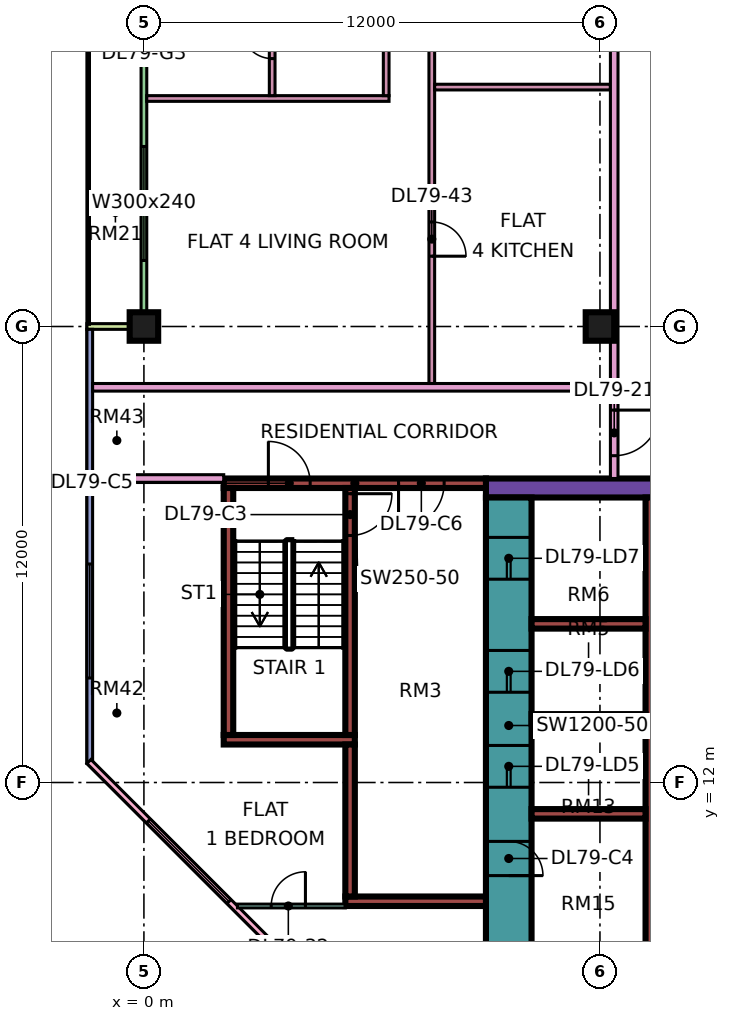
"""IFC4 building model, lengths in metres.
Left out: names, types, materials, properties, quantities, classifications, styles, units other than length and angle.
Written with IfcOpenShell. Run it as: python <this file> out.ifc"""

import sys

from ifc_helpers import new_model, si_unit, direction, frame, frame_2d, origin, origin_2d, place, context, subcontext, project, spatial, rectangle, extrude, element, fill, save


model = new_model("IFC4")
c1 = context("Model", 3, precision=1e-05, world=origin(), true_north=direction((0.0, 1.0)))
c2 = subcontext(c1, "Body", "Model", "MODEL_VIEW")
j1 = project(units=[si_unit("LENGTHUNIT", "METRE"), si_unit("PLANEANGLEUNIT", "RADIAN")], contexts=[c1])
p1 = place(None, origin())
s1 = spatial("IfcSite", under=j1, at=p1, CompositionType="ELEMENT")
p2 = place(p1, origin())
s2 = spatial("IfcBuilding", under=s1, at=p2, CompositionType="ELEMENT")
p3 = place(p2, frame((0.0, 0.0, 342.65)))
s3 = spatial("IfcBuildingStorey", under=s2, at=p3, CompositionType="ELEMENT", Elevation=342.65)
for number, where, z_axis, x_axis in (
    (1, (0.0, 24.0, 0.0), (0.0, 0.0, 1.0), (1.0, 0.0, 0.0)),
    (2, (12.0, 24.0, 0.0), (0.0, 0.0, 1.0), (1.0, 0.0, 0.0)),
):
    element("IfcColumn", number, at=place(p3, frame(where, z_axis=z_axis, x_axis=x_axis)), inside=s3, PredefinedType="COLUMN", context=c2, shape_type="SweptSolid", body=[
        extrude(rectangle(XDim=0.75, YDim=0.75, at=origin_2d()), origin(), (0.0, 0.0, 1.0), 3.75),
    ])
p4 = place(p3, frame((9.0, 19.75, 0.0), z_axis=(0.0, 0.0, 1.0), x_axis=(1.0, 0.0, 0.0)))
e3 = element("IfcWall", 3, at=p4, inside=s3, PredefinedType="SHEAR", context=c2, shape_type="SweptSolid", body=[
    extrude(rectangle(XDim=25.0, YDim=0.5, at=frame_2d((12.5, 0.0))), origin(), (0.0, 0.0, 1.0), 3.75),
])
p5 = place(p4, frame((19.1, 0.0, 0.0)))
e4 = element("IfcOpeningElement", 4, at=p5, cuts=e3, PredefinedType="OPENING", context=c2, shape_type="SweptSolid", body=[
    extrude(rectangle(XDim=1.8, YDim=2.4, at=frame_2d((0.9, 1.2))), frame((0.0, 0.26, 0.0), z_axis=(0.0, -1.0, 0.0), x_axis=(1.0, 0.0, 0.0)), (0.0, 0.0, 1.0), 0.52),
])
p6 = place(p3, frame((9.6, 7.5, 0.0), z_axis=(0.0, 0.0, 1.0), x_axis=(0.0, 1.0, 0.0)))
e5 = element("IfcWall", 5, at=p6, inside=s3, PredefinedType="SHEAR", context=c2, shape_type="SweptSolid", body=[
    extrude(rectangle(XDim=12.0, YDim=1.2, at=frame_2d((6.0, 0.0))), origin(), (0.0, 0.0, 1.0), 3.75),
])
p7 = place(p6, frame((4.375, 0.0, 0.0)))
e6 = element("IfcOpeningElement", 6, at=p7, cuts=e5, PredefinedType="OPENING", context=c2, shape_type="SweptSolid", body=[
    extrude(rectangle(XDim=1.1, YDim=2.2, at=frame_2d((0.55, 1.1))), frame((0.0, 0.61, 0.0), z_axis=(0.0, -1.0, 0.0), x_axis=(1.0, 0.0, 0.0)), (0.0, 0.0, 1.0), 1.22),
])
p8 = place(p6, frame((6.875, 0.0, 0.0)))
e7 = element("IfcOpeningElement", 7, at=p8, cuts=e5, PredefinedType="OPENING", context=c2, shape_type="SweptSolid", body=[
    extrude(rectangle(XDim=1.1, YDim=2.2, at=frame_2d((0.55, 1.1))), frame((0.0, 0.61, 0.0), z_axis=(0.0, -1.0, 0.0), x_axis=(1.0, 0.0, 0.0)), (0.0, 0.0, 1.0), 1.22),
])
p9 = place(p6, frame((9.85, 0.0, 0.0)))
e8 = element("IfcOpeningElement", 8, at=p9, cuts=e5, PredefinedType="OPENING", context=c2, shape_type="SweptSolid", body=[
    extrude(rectangle(XDim=1.1, YDim=2.2, at=frame_2d((0.55, 1.1))), frame((0.0, 0.61, 0.0), z_axis=(0.0, -1.0, 0.0), x_axis=(1.0, 0.0, 0.0)), (0.0, 0.0, 1.0), 1.22),
])
p10 = place(p6, frame((2.05, 0.0, 0.0)))
e9 = element("IfcOpeningElement", 9, at=p10, cuts=e5, PredefinedType="OPENING", context=c2, shape_type="SweptSolid", body=[
    extrude(rectangle(XDim=0.9, YDim=2.1, at=frame_2d((0.45, 1.05))), frame((0.0, 0.61, 0.0), z_axis=(0.0, -1.0, 0.0), x_axis=(1.0, 0.0, 0.0)), (0.0, 0.0, 1.0), 1.22),
])
p11 = place(p3, frame((13.325, 7.5, 0.0), z_axis=(0.0, 0.0, 1.0), x_axis=(0.0, 1.0, 0.0)))
e10 = element("IfcWall", 10, at=p11, inside=s3, PredefinedType="SHEAR", context=c2, shape_type="SweptSolid", body=[
    extrude(rectangle(XDim=12.0, YDim=0.25, at=frame_2d((6.0, 0.0))), origin(), (0.0, 0.0, 1.0), 3.75),
])
for number, where, z_axis, x_axis in (
    (11, (10.2, 11.175, 0.0), (0.0, 0.0, 1.0), (1.0, 0.0, 0.0)),
    (12, (10.2, 13.675, 0.0), (0.0, 0.0, 1.0), (1.0, 0.0, 0.0)),
    (13, (10.2, 16.175, 0.0), (0.0, 0.0, 1.0), (1.0, 0.0, 0.0)),
):
    element("IfcWall", number, at=place(p3, frame(where, z_axis=z_axis, x_axis=x_axis)), inside=s3, PredefinedType="SHEAR", context=c2, shape_type="SweptSolid", body=[
        extrude(rectangle(XDim=3.0, YDim=0.25, at=frame_2d((1.5, 0.0))), origin(), (0.0, 0.0, 1.0), 3.75),
    ])
p12 = place(p3, frame((2.1, 19.875, 0.0), z_axis=(0.0, 0.0, 1.0), x_axis=(1.0, 0.0, 0.0)))
e14 = element("IfcWall", 14, at=p12, inside=s3, PredefinedType="SHEAR", context=c2, shape_type="SweptSolid", body=[
    extrude(rectangle(XDim=6.9, YDim=0.25, at=frame_2d((3.45, 0.0))), origin(), (0.0, 0.0, 1.0), 3.75),
])
p13 = place(p12, frame((1.175, 0.0, 0.0)))
e15 = element("IfcOpeningElement", 15, at=p13, cuts=e14, PredefinedType="OPENING", context=c2, shape_type="SweptSolid", body=[
    extrude(rectangle(XDim=1.1, YDim=2.2, at=frame_2d((0.55, 1.1))), frame((0.0, 0.135, 0.0), z_axis=(0.0, -1.0, 0.0), x_axis=(1.0, 0.0, 0.0)), (0.0, 0.0, 1.0), 0.27),
])
p14 = place(p12, frame((4.6, 0.0, 0.0)))
e16 = element("IfcOpeningElement", 16, at=p14, cuts=e14, PredefinedType="OPENING", context=c2, shape_type="SweptSolid", body=[
    extrude(rectangle(XDim=1.2, YDim=2.2, at=frame_2d((0.6, 1.1))), frame((0.0, 0.135, 0.0), z_axis=(0.0, -1.0, 0.0), x_axis=(1.0, 0.0, 0.0)), (0.0, 0.0, 1.0), 0.27),
])
p15 = place(p3, frame((2.1, 13.125, 0.0), z_axis=(0.0, 0.0, 1.0), x_axis=(1.0, 0.0, 0.0)))
e17 = element("IfcWall", 17, at=p15, inside=s3, PredefinedType="SHEAR", context=c2, shape_type="SweptSolid", body=[
    extrude(rectangle(XDim=3.45, YDim=0.25, at=frame_2d((1.725, 0.0))), origin(), (0.0, 0.0, 1.0), 3.75),
])
p16 = place(p3, frame((2.225, 13.25, 0.0), z_axis=(0.0, 0.0, 1.0), x_axis=(0.0, 1.0, 0.0)))
e18 = element("IfcWall", 18, at=p16, inside=s3, PredefinedType="SHEAR", context=c2, shape_type="SweptSolid", body=[
    extrude(rectangle(XDim=6.5, YDim=0.25, at=frame_2d((3.25, 0.0))), origin(), (0.0, 0.0, 1.0), 3.75),
])
p17 = place(p3, frame((5.425, 13.25, 0.0), z_axis=(0.0, 0.0, 1.0), x_axis=(0.0, 1.0, 0.0)))
e19 = element("IfcWall", 19, at=p17, inside=s3, PredefinedType="SHEAR", context=c2, shape_type="SweptSolid", body=[
    extrude(rectangle(XDim=6.5, YDim=0.25, at=frame_2d((3.25, 0.0))), origin(), (0.0, 0.0, 1.0), 3.75),
])
p18 = place(p17, frame((5.25, 0.0, 0.0)))
e20 = element("IfcOpeningElement", 20, at=p18, cuts=e19, PredefinedType="OPENING", context=c2, shape_type="SweptSolid", body=[
    extrude(rectangle(XDim=1.1, YDim=2.2, at=frame_2d((0.55, 1.1))), frame((0.0, 0.135, 0.0), z_axis=(0.0, -1.0, 0.0), x_axis=(1.0, 0.0, 0.0)), (0.0, 0.0, 1.0), 0.27),
])
p19 = place(p3, frame((5.3, 8.875, 0.0), z_axis=(0.0, 0.0, 1.0), x_axis=(1.0, 0.0, 0.0)))
e21 = element("IfcWall", 21, at=p19, inside=s3, PredefinedType="SHEAR", context=c2, shape_type="SweptSolid", body=[
    extrude(rectangle(XDim=3.7, YDim=0.25, at=frame_2d((1.85, 0.0))), origin(), (0.0, 0.0, 1.0), 3.75),
])
p20 = place(p3, frame((5.425, 9.0, 0.0), z_axis=(0.0, 0.0, 1.0), x_axis=(0.0, 1.0, 0.0)))
e22 = element("IfcWall", 22, at=p20, inside=s3, PredefinedType="SHEAR", context=c2, shape_type="SweptSolid", body=[
    extrude(rectangle(XDim=4.0, YDim=0.25, at=frame_2d((2.0, 0.0))), origin(), (0.0, 0.0, 1.0), 3.75),
])
p21 = place(p3, frame((0.0, 35.925, 0.0), z_axis=(0.0, 0.0, 1.0), x_axis=(0.0, -1.0, 0.0)))
e23 = element("IfcWall", 23, at=p21, inside=s3, PredefinedType="SOLIDWALL", context=c2, shape_type="SweptSolid", body=[
    extrude(rectangle(XDim=11.85, YDim=0.15, at=frame_2d((5.925, 0.0))), origin(), (0.0, 0.0, 1.0), 3.35),
])
p22 = place(p21, frame((2.262, 0.0, 0.0)))
e24 = element("IfcOpeningElement", 24, at=p22, cuts=e23, PredefinedType="OPENING", context=c2, shape_type="SweptSolid", body=[
    extrude(rectangle(XDim=1.8, YDim=2.4, at=frame_2d((0.9, 1.2))), frame((0.0, 0.085, 0.0), z_axis=(0.0, -1.0, 0.0), x_axis=(1.0, 0.0, 0.0)), (0.0, 0.0, 1.0), 0.17),
])
p23 = place(p21, frame((7.188, 0.0, 0.45)))
e25 = element("IfcOpeningElement", 25, at=p23, cuts=e23, PredefinedType="OPENING", context=c2, shape_type="SweptSolid", body=[
    extrude(rectangle(XDim=3.0, YDim=2.4, at=frame_2d((1.5, 1.2))), frame((0.0, 0.085, 0.0), z_axis=(0.0, -1.0, 0.0), x_axis=(1.0, 0.0, 0.0)), (0.0, 0.0, 1.0), 0.17),
])
p24 = place(p3, frame((-1.5, 24.0, 0.0), z_axis=(0.0, 0.0, 1.0), x_axis=(1.0, 0.0, 0.0)))
e26 = element("IfcWall", 26, at=p24, inside=s3, PredefinedType="SOLIDWALL", context=c2, shape_type="SweptSolid", body=[
    extrude(rectangle(XDim=1.5, YDim=0.15, at=frame_2d((0.75, 0.0))), origin(), (0.0, 0.0, 1.0), 3.35),
])
p25 = place(p3, frame((-1.425, 23.925, 0.0), z_axis=(0.0, 0.0, 1.0), x_axis=(0.0, -1.0, 0.0)))
e27 = element("IfcWall", 27, at=p25, inside=s3, PredefinedType="SOLIDWALL", context=c2, shape_type="SweptSolid", body=[
    extrude(rectangle(XDim=11.425, YDim=0.15, at=frame_2d((5.712, 0.0))), origin(), (0.0, 0.0, 1.0), 3.35),
])
p26 = place(p25, frame((6.175, 0.0, 0.45)))
e28 = element("IfcOpeningElement", 28, at=p26, cuts=e27, PredefinedType="OPENING", context=c2, shape_type="SweptSolid", body=[
    extrude(rectangle(XDim=3.0, YDim=2.4, at=frame_2d((1.5, 1.2))), frame((0.0, 0.085, 0.0), z_axis=(0.0, -1.0, 0.0), x_axis=(1.0, 0.0, 0.0)), (0.0, 0.0, 1.0), 0.17),
])
p27 = place(p3, frame((-1.447, 12.553, 0.0), z_axis=(0.0, 0.0, 1.0), x_axis=(0.707106781187, -0.707106781187, 0.0)))
e29 = element("IfcWall", 29, at=p27, inside=s3, PredefinedType="SOLIDWALL", context=c2, shape_type="SweptSolid", body=[
    extrude(rectangle(XDim=19.799, YDim=0.15, at=frame_2d((9.899, 0.0))), origin(), (0.0, 0.0, 1.0), 3.35),
])
p28 = place(p27, frame((2.212, 0.0, 0.45)))
e30 = element("IfcOpeningElement", 30, at=p28, cuts=e29, PredefinedType="OPENING", context=c2, shape_type="SweptSolid", body=[
    extrude(rectangle(XDim=3.0, YDim=2.4, at=frame_2d((1.5, 1.2))), frame((0.0, 0.085, 0.0), z_axis=(0.0, -1.0, 0.0), x_axis=(1.0, 0.0, 0.0)), (0.0, 0.0, 1.0), 0.17),
])
p29 = place(p27, frame((10.216, 0.0, 0.45)))
e31 = element("IfcOpeningElement", 31, at=p29, cuts=e29, PredefinedType="OPENING", context=c2, shape_type="SweptSolid", body=[
    extrude(rectangle(XDim=3.0, YDim=2.4, at=frame_2d((1.5, 1.2))), frame((0.0, 0.085, 0.0), z_axis=(0.0, -1.0, 0.0), x_axis=(1.0, 0.0, 0.0)), (0.0, 0.0, 1.0), 0.17),
])
p30 = place(p3, frame((-1.35, 20.0, 0.0), z_axis=(0.0, 0.0, 1.0), x_axis=(1.0, 0.0, 0.0)))
e32 = element("IfcWall", 32, at=p30, inside=s3, PredefinedType="PARTITIONING", context=c2, shape_type="SweptSolid", body=[
    extrude(rectangle(XDim=3.45, YDim=0.2, at=frame_2d((1.725, 0.0))), origin(), (0.0, 0.0, 1.0), 3.35),
])
p31 = place(p3, frame((-1.35, 22.4, 0.0), z_axis=(0.0, 0.0, 1.0), x_axis=(1.0, 0.0, 0.0)))
e33 = element("IfcWall", 33, at=p31, inside=s3, PredefinedType="PARTITIONING", context=c2, shape_type="SweptSolid", body=[
    extrude(rectangle(XDim=13.625, YDim=0.2, at=frame_2d((6.812, 0.0))), origin(), (0.0, 0.0, 1.0), 3.35),
])
p32 = place(p3, frame((0.074, 30.0, 0.0), z_axis=(0.0, 0.0, 1.0), x_axis=(1.0, 0.0, 0.0)))
e34 = element("IfcWall", 34, at=p32, inside=s3, PredefinedType="PARTITIONING", context=c2, shape_type="SweptSolid", body=[
    extrude(rectangle(XDim=6.376, YDim=0.15, at=frame_2d((3.188, 0.0))), origin(), (0.0, 0.0, 1.0), 3.35),
])
p33 = place(p3, frame((2.461, 8.75, 0.0), z_axis=(0.0, 0.0, 1.0), x_axis=(1.0, 0.0, 0.0)))
e35 = element("IfcWall", 35, at=p33, inside=s3, PredefinedType="PARTITIONING", context=c2, shape_type="SweptSolid", body=[
    extrude(rectangle(XDim=2.839, YDim=0.1, at=frame_2d((1.419, 0.0))), origin(), (0.0, 0.0, 1.0), 3.35),
])
p34 = place(p33, frame((0.889, 0.0, 0.0)))
e36 = element("IfcOpeningElement", 36, at=p34, cuts=e35, PredefinedType="OPENING", context=c2, shape_type="SweptSolid", body=[
    extrude(rectangle(XDim=0.9, YDim=2.1, at=frame_2d((0.45, 1.05))), frame((0.0, 0.06, 0.0), z_axis=(0.0, -1.0, 0.0), x_axis=(1.0, 0.0, 0.0)), (0.0, 0.0, 1.0), 0.12),
])
p35 = place(p3, frame((3.375, 30.075, 0.0), z_axis=(0.0, 0.0, 1.0), x_axis=(0.0, 1.0, 0.0)))
e37 = element("IfcWall", 37, at=p35, inside=s3, PredefinedType="PARTITIONING", context=c2, shape_type="SweptSolid", body=[
    extrude(rectangle(XDim=3.0, YDim=0.15, at=frame_2d((1.5, 0.0))), origin(), (0.0, 0.0, 1.0), 3.35),
])
p36 = place(p35, frame((0.975, 0.0, 0.0)))
e38 = element("IfcOpeningElement", 38, at=p36, cuts=e37, PredefinedType="OPENING", context=c2, shape_type="SweptSolid", body=[
    extrude(rectangle(XDim=0.8, YDim=2.1, at=frame_2d((0.4, 1.05))), frame((0.0, 0.085, 0.0), z_axis=(0.0, -1.0, 0.0), x_axis=(1.0, 0.0, 0.0)), (0.0, 0.0, 1.0), 0.17),
])
p37 = place(p3, frame((6.375, 30.075, 0.0), z_axis=(0.0, 0.0, 1.0), x_axis=(0.0, 1.0, 0.0)))
e39 = element("IfcWall", 39, at=p37, inside=s3, PredefinedType="PARTITIONING", context=c2, shape_type="SweptSolid", body=[
    extrude(rectangle(XDim=5.825, YDim=0.15, at=frame_2d((2.913, 0.0))), origin(), (0.0, 0.0, 1.0), 3.35),
])
p38 = place(p37, frame((3.975, 0.0, 0.0)))
e40 = element("IfcOpeningElement", 40, at=p38, cuts=e39, PredefinedType="OPENING", context=c2, shape_type="SweptSolid", body=[
    extrude(rectangle(XDim=0.9, YDim=2.1, at=frame_2d((0.45, 1.05))), frame((0.0, 0.085, 0.0), z_axis=(0.0, -1.0, 0.0), x_axis=(1.0, 0.0, 0.0)), (0.0, 0.0, 1.0), 0.17),
])
p39 = place(p3, frame((7.575, 22.5, 0.0), z_axis=(0.0, 0.0, 1.0), x_axis=(0.0, 1.0, 0.0)))
e41 = element("IfcWall", 41, at=p39, inside=s3, PredefinedType="PARTITIONING", context=c2, shape_type="SweptSolid", body=[
    extrude(rectangle(XDim=10.875, YDim=0.15, at=frame_2d((5.438, 0.0))), origin(), (0.0, 0.0, 1.0), 3.35),
])
p40 = place(p39, frame((8.85, 0.0, 0.0)))
e42 = element("IfcOpeningElement", 42, at=p40, cuts=e41, PredefinedType="OPENING", context=c2, shape_type="SweptSolid", body=[
    extrude(rectangle(XDim=0.8, YDim=2.1, at=frame_2d((0.4, 1.05))), frame((0.0, 0.085, 0.0), z_axis=(0.0, -1.0, 0.0), x_axis=(1.0, 0.0, 0.0)), (0.0, 0.0, 1.0), 0.17),
])
p41 = place(p39, frame((3.35, 0.0, 0.0)))
e43 = element("IfcOpeningElement", 43, at=p41, cuts=e41, PredefinedType="OPENING", context=c2, shape_type="SweptSolid", body=[
    extrude(rectangle(XDim=0.9, YDim=2.1, at=frame_2d((0.45, 1.05))), frame((0.0, 0.085, 0.0), z_axis=(0.0, -1.0, 0.0), x_axis=(1.0, 0.0, 0.0)), (0.0, 0.0, 1.0), 0.17),
])
p42 = place(p3, frame((7.65, 30.3, 0.0), z_axis=(0.0, 0.0, 1.0), x_axis=(1.0, 0.0, 0.0)))
e44 = element("IfcWall", 44, at=p42, inside=s3, PredefinedType="PARTITIONING", context=c2, shape_type="SweptSolid", body=[
    extrude(rectangle(XDim=4.625, YDim=0.15, at=frame_2d((2.312, 0.0))), origin(), (0.0, 0.0, 1.0), 3.35),
])
p43 = place(p3, frame((12.375, 20.0, 0.0), z_axis=(0.0, 0.0, 1.0), x_axis=(0.0, 1.0, 0.0)))
e45 = element("IfcWall", 45, at=p43, inside=s3, PredefinedType="PARTITIONING", context=c2, shape_type="SweptSolid", body=[
    extrude(rectangle(XDim=34.0, YDim=0.2, at=frame_2d((17.0, 0.0))), origin(), (0.0, 0.0, 1.0), 3.35),
])
p44 = place(p43, frame((31.8, 0.0, 0.0)))
e46 = element("IfcOpeningElement", 46, at=p44, cuts=e45, PredefinedType="OPENING", context=c2, shape_type="SweptSolid", body=[
    extrude(rectangle(XDim=1.0, YDim=2.1, at=frame_2d((0.5, 1.05))), frame((0.0, 0.11, 0.0), z_axis=(0.0, -1.0, 0.0), x_axis=(1.0, 0.0, 0.0)), (0.0, 0.0, 1.0), 0.22),
])
p45 = place(p43, frame((0.6, 0.0, 0.0)))
e47 = element("IfcOpeningElement", 47, at=p45, cuts=e45, PredefinedType="OPENING", context=c2, shape_type="SweptSolid", body=[
    extrude(rectangle(XDim=1.2, YDim=2.1, at=frame_2d((0.6, 1.05))), frame((0.0, 0.11, 0.0), z_axis=(0.0, -1.0, 0.0), x_axis=(1.0, 0.0, 0.0)), (0.0, 0.0, 1.0), 0.22),
])
p46 = place(p43, frame((14.1, 0.0, 0.0)))
e48 = element("IfcOpeningElement", 48, at=p46, cuts=e45, PredefinedType="OPENING", context=c2, shape_type="SweptSolid", body=[
    extrude(rectangle(XDim=1.0, YDim=2.1, at=frame_2d((0.5, 1.05))), frame((0.0, 0.11, 0.0), z_axis=(0.0, -1.0, 0.0), x_axis=(1.0, 0.0, 0.0)), (0.0, 0.0, 1.0), 0.22),
])
p47 = place(p23, origin())
e49 = element("IfcWindow", 49, at=p47, inside=s3, PartitioningType="SINGLE_PANEL", PredefinedType="WINDOW", context=c2, shape_type="SweptSolid", body=[
    extrude(rectangle(XDim=3.0, YDim=2.4, at=frame_2d((1.5, 1.2))), frame((0.0, 0.03, 0.0), z_axis=(0.0, -1.0, 0.0), x_axis=(1.0, 0.0, 0.0)), (0.0, 0.0, 1.0), 0.06),
])
fill(e25, e49)
p48 = place(p26, origin())
e50 = element("IfcWindow", 50, at=p48, inside=s3, PartitioningType="SINGLE_PANEL", PredefinedType="WINDOW", context=c2, shape_type="SweptSolid", body=[
    extrude(rectangle(XDim=3.0, YDim=2.4, at=frame_2d((1.5, 1.2))), frame((0.0, 0.03, 0.0), z_axis=(0.0, -1.0, 0.0), x_axis=(1.0, 0.0, 0.0)), (0.0, 0.0, 1.0), 0.06),
])
fill(e28, e50)
p49 = place(p28, origin())
e51 = element("IfcWindow", 51, at=p49, inside=s3, PartitioningType="SINGLE_PANEL", PredefinedType="WINDOW", context=c2, shape_type="SweptSolid", body=[
    extrude(rectangle(XDim=3.0, YDim=2.4, at=frame_2d((1.5, 1.2))), frame((0.0, 0.03, 0.0), z_axis=(0.0, -1.0, 0.0), x_axis=(1.0, 0.0, 0.0)), (0.0, 0.0, 1.0), 0.06),
])
fill(e30, e51)
p50 = place(p7, origin())
e52 = element("IfcDoor", 52, at=p50, inside=s3, OperationType="DOUBLE_DOOR_SLIDING", PredefinedType="DOOR", context=c2, shape_type="SweptSolid", body=[
    extrude(rectangle(XDim=1.1, YDim=2.2, at=frame_2d((0.55, 1.1))), frame((0.0, 0.025, 0.0), z_axis=(0.0, -1.0, 0.0), x_axis=(1.0, 0.0, 0.0)), (0.0, 0.0, 1.0), 0.05),
])
fill(e6, e52)
p51 = place(p8, origin())
e53 = element("IfcDoor", 53, at=p51, inside=s3, OperationType="DOUBLE_DOOR_SLIDING", PredefinedType="DOOR", context=c2, shape_type="SweptSolid", body=[
    extrude(rectangle(XDim=1.1, YDim=2.2, at=frame_2d((0.55, 1.1))), frame((0.0, 0.025, 0.0), z_axis=(0.0, -1.0, 0.0), x_axis=(1.0, 0.0, 0.0)), (0.0, 0.0, 1.0), 0.05),
])
fill(e7, e53)
p52 = place(p9, origin())
e54 = element("IfcDoor", 54, at=p52, inside=s3, OperationType="DOUBLE_DOOR_SLIDING", PredefinedType="DOOR", context=c2, shape_type="SweptSolid", body=[
    extrude(rectangle(XDim=1.1, YDim=2.2, at=frame_2d((0.55, 1.1))), frame((0.0, 0.025, 0.0), z_axis=(0.0, -1.0, 0.0), x_axis=(1.0, 0.0, 0.0)), (0.0, 0.0, 1.0), 0.05),
])
fill(e8, e54)
p53 = place(p18, origin())
e55 = element("IfcDoor", 55, at=p53, inside=s3, OperationType="SINGLE_SWING_RIGHT", PredefinedType="DOOR", context=c2, shape_type="SweptSolid", body=[
    extrude(rectangle(XDim=1.1, YDim=2.2, at=frame_2d((0.55, 1.1))), frame((0.0, 0.025, 0.0), z_axis=(0.0, -1.0, 0.0), x_axis=(1.0, 0.0, 0.0)), (0.0, 0.0, 1.0), 0.05),
])
fill(e20, e55)
p54 = place(p10, frame((0.9, 0.0, 0.0), z_axis=(0.0, 0.0, 1.0), x_axis=(-1.0, 0.0, 0.0)))
e56 = element("IfcDoor", 56, at=p54, inside=s3, OperationType="SINGLE_SWING_LEFT", PredefinedType="DOOR", context=c2, shape_type="SweptSolid", body=[
    extrude(rectangle(XDim=0.9, YDim=2.1, at=frame_2d((0.45, 1.05))), frame((0.0, 0.025, 0.0), z_axis=(0.0, -1.0, 0.0), x_axis=(1.0, 0.0, 0.0)), (0.0, 0.0, 1.0), 0.05),
])
fill(e9, e56)
p55 = place(p13, origin())
e57 = element("IfcDoor", 57, at=p55, inside=s3, OperationType="SINGLE_SWING_LEFT", PredefinedType="DOOR", context=c2, shape_type="SweptSolid", body=[
    extrude(rectangle(XDim=1.1, YDim=2.2, at=frame_2d((0.55, 1.1))), frame((0.0, 0.025, 0.0), z_axis=(0.0, -1.0, 0.0), x_axis=(1.0, 0.0, 0.0)), (0.0, 0.0, 1.0), 0.05),
])
fill(e15, e57)
p56 = place(p14, frame((1.2, 0.0, 0.0), z_axis=(0.0, 0.0, 1.0), x_axis=(-1.0, 0.0, 0.0)))
e58 = element("IfcDoor", 58, at=p56, inside=s3, OperationType="SINGLE_SWING_LEFT", PredefinedType="DOOR", context=c2, shape_type="SweptSolid", body=[
    extrude(rectangle(XDim=1.2, YDim=2.2, at=frame_2d((0.6, 1.1))), frame((0.0, 0.025, 0.0), z_axis=(0.0, -1.0, 0.0), x_axis=(1.0, 0.0, 0.0)), (0.0, 0.0, 1.0), 0.05),
])
fill(e16, e58)
p57 = place(p45, origin())
e59 = element("IfcDoor", 59, at=p57, inside=s3, OperationType="SINGLE_SWING_RIGHT", PredefinedType="DOOR", context=c2, shape_type="SweptSolid", body=[
    extrude(rectangle(XDim=1.2, YDim=2.1, at=frame_2d((0.6, 1.05))), frame((0.0, 0.025, 0.0), z_axis=(0.0, -1.0, 0.0), x_axis=(1.0, 0.0, 0.0)), (0.0, 0.0, 1.0), 0.05),
])
fill(e47, e59)
p58 = place(p34, frame((0.9, 0.0, 0.0), z_axis=(0.0, 0.0, 1.0), x_axis=(-1.0, 0.0, 0.0)))
e60 = element("IfcDoor", 60, at=p58, inside=s3, OperationType="SINGLE_SWING_RIGHT", PredefinedType="DOOR", context=c2, shape_type="SweptSolid", body=[
    extrude(rectangle(XDim=0.9, YDim=2.1, at=frame_2d((0.45, 1.05))), frame((0.0, 0.025, 0.0), z_axis=(0.0, -1.0, 0.0), x_axis=(1.0, 0.0, 0.0)), (0.0, 0.0, 1.0), 0.05),
])
fill(e36, e60)
p59 = place(p36, frame((0.8, 0.0, 0.0), z_axis=(0.0, 0.0, 1.0), x_axis=(-1.0, 0.0, 0.0)))
e61 = element("IfcDoor", 61, at=p59, inside=s3, OperationType="SINGLE_SWING_RIGHT", PredefinedType="DOOR", context=c2, shape_type="SweptSolid", body=[
    extrude(rectangle(XDim=0.8, YDim=2.1, at=frame_2d((0.4, 1.05))), frame((0.0, 0.025, 0.0), z_axis=(0.0, -1.0, 0.0), x_axis=(1.0, 0.0, 0.0)), (0.0, 0.0, 1.0), 0.05),
])
fill(e38, e61)
p60 = place(p41, frame((0.9, 0.0, 0.0), z_axis=(0.0, 0.0, 1.0), x_axis=(-1.0, 0.0, 0.0)))
e62 = element("IfcDoor", 62, at=p60, inside=s3, OperationType="SINGLE_SWING_LEFT", PredefinedType="DOOR", context=c2, shape_type="SweptSolid", body=[
    extrude(rectangle(XDim=0.9, YDim=2.1, at=frame_2d((0.45, 1.05))), frame((0.0, 0.025, 0.0), z_axis=(0.0, -1.0, 0.0), x_axis=(1.0, 0.0, 0.0)), (0.0, 0.0, 1.0), 0.05),
])
fill(e43, e62)
save(model, sys.argv[1])
